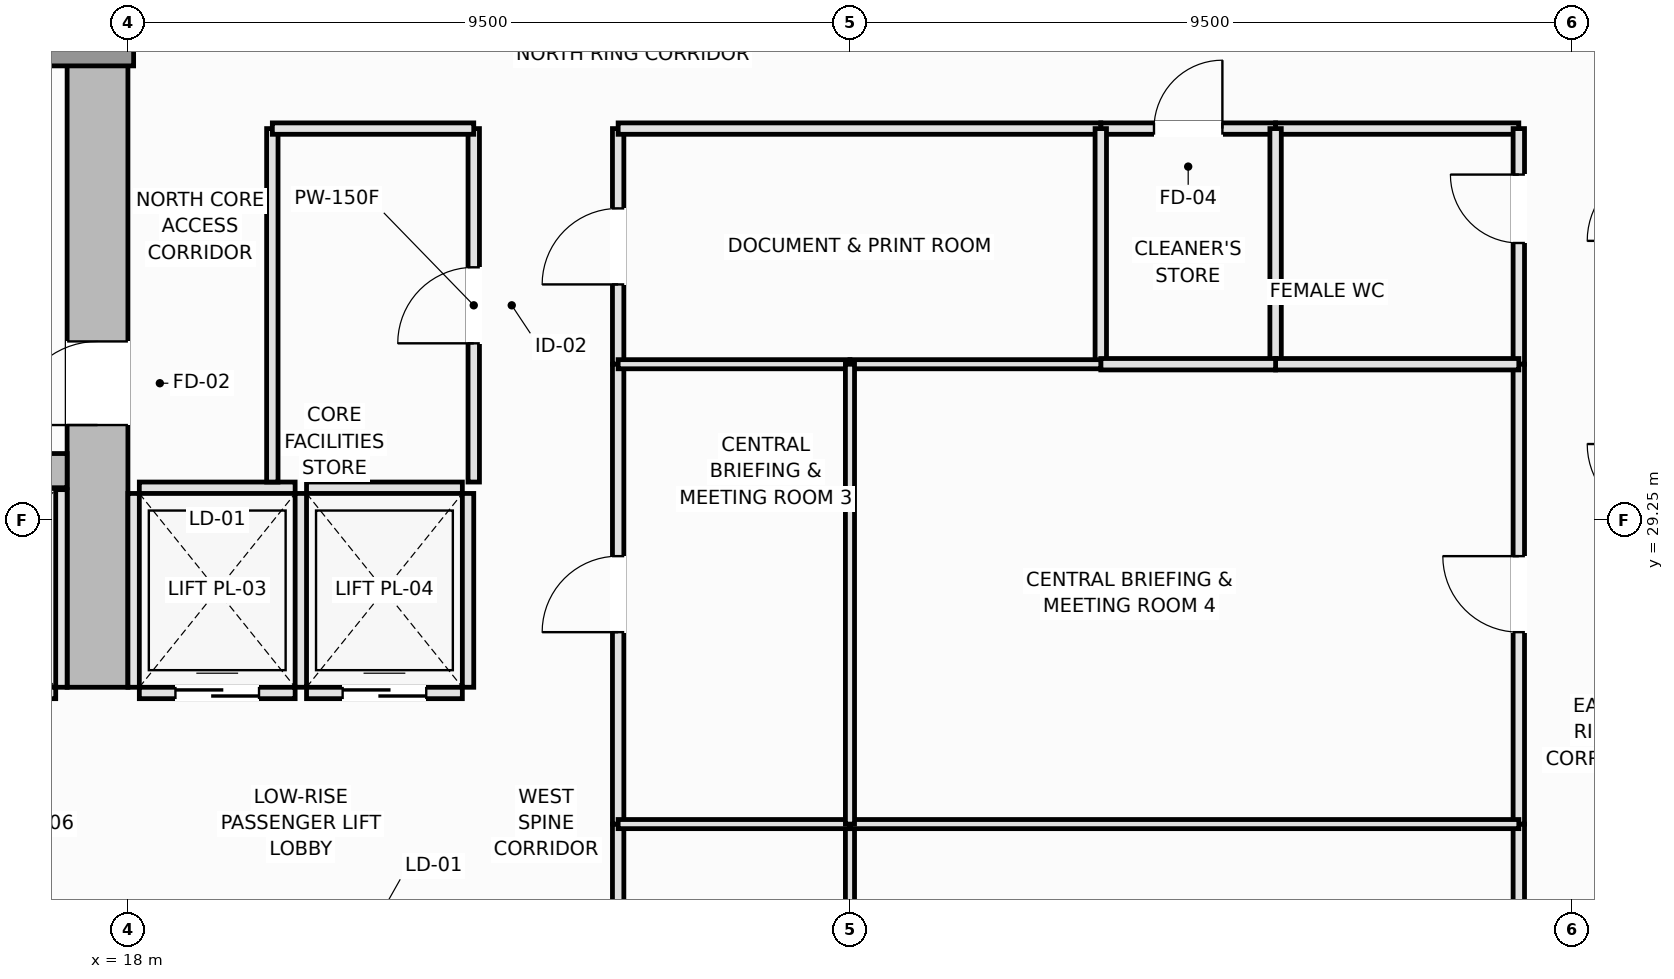
"""IFC4 building model, lengths in metres.
Left out: names, types, materials, properties, quantities, classifications, styles, units other than length and angle.
Written with IfcOpenShell. Run it as: python <this file> out.ifc"""

import sys

from ifc_helpers import new_model, si_unit, direction, frame, frame_2d, origin, origin_2d, place, context, subcontext, project, spatial, rectangle, extrude, element, fill, save


model = new_model("IFC4")
c1 = context("Model", 3, precision=1e-05, world=origin(), true_north=direction((0.0, 1.0)))
c2 = subcontext(c1, "Body", "Model", "MODEL_VIEW")
j1 = project(units=[si_unit("LENGTHUNIT", "METRE"), si_unit("PLANEANGLEUNIT", "RADIAN")], contexts=[c1])
p1 = place(None, origin())
s1 = spatial("IfcSite", under=j1, at=p1, CompositionType="ELEMENT")
p2 = place(p1, origin())
s2 = spatial("IfcBuilding", under=s1, at=p2, CompositionType="ELEMENT")
p3 = place(p2, frame((0.0, 0.0, 82.4)))
s3 = spatial("IfcBuildingStorey", under=s2, at=p3, CompositionType="ELEMENT", Elevation=82.4)
p4 = place(p3, frame((17.6, 27.05, 0.0), z_axis=(0.0, 0.0, 1.0), x_axis=(0.0, 1.0, 0.0)))
e1 = element("IfcWall", 1, at=p4, inside=s3, PredefinedType="SHEAR", context=c2, shape_type="SweptSolid", body=[
    extrude(rectangle(XDim=8.65, YDim=0.8, at=frame_2d((4.325, 0.0))), origin(), (0.0, 0.0, 1.0), 3.55),
])
p5 = place(p4, frame((3.45, 0.0, 0.0)))
e2 = element("IfcOpeningElement", 2, at=p5, cuts=e1, PredefinedType="OPENING", context=c2, shape_type="SweptSolid", body=[
    extrude(rectangle(XDim=1.1, YDim=2.15, at=frame_2d((0.55, 1.075))), frame((0.0, 0.41, 0.0), z_axis=(0.0, -1.0, 0.0), x_axis=(1.0, 0.0, 0.0)), (0.0, 0.0, 1.0), 0.82),
])
p6 = place(p3, frame((5.3, 29.9, 0.0), z_axis=(0.0, 0.0, 1.0), x_axis=(1.0, 0.0, 0.0)))
e3 = element("IfcWall", 3, at=p6, inside=s3, PredefinedType="SHEAR", context=c2, shape_type="SweptSolid", body=[
    extrude(rectangle(XDim=11.9, YDim=0.45, at=frame_2d((5.95, 0.0))), origin(), (0.0, 0.0, 1.0), 3.55),
])
p7 = place(p3, frame((17.4, 35.9, 0.0), z_axis=(0.0, 0.0, 1.0), x_axis=(1.0, 0.0, 0.0)))
e4 = element("IfcColumn", 4, at=p7, inside=s3, PredefinedType="PILASTER", context=c2, shape_type="SweptSolid", body=[
    extrude(rectangle(XDim=1.35, YDim=1.35, at=origin_2d()), origin(), (0.0, 0.0, 1.0), 3.55),
])
p8 = place(p3, frame((18.15, 26.975, 0.0), z_axis=(0.0, 0.0, 1.0), x_axis=(1.0, 0.0, 0.0)))
e5 = element("IfcWall", 5, at=p8, inside=s3, PredefinedType="PARTITIONING", context=c2, shape_type="SweptSolid", body=[
    extrude(rectangle(XDim=2.05, YDim=0.15, at=frame_2d((1.025, 0.0))), origin(), (0.0, 0.0, 1.0), 3.37),
])
p9 = place(p8, frame((0.475, 0.0, 0.0)))
e6 = element("IfcOpeningElement", 6, at=p9, cuts=e5, PredefinedType="OPENING", context=c2, shape_type="SweptSolid", body=[
    extrude(rectangle(XDim=1.1, YDim=2.2, at=frame_2d((0.55, 1.1))), frame((0.0, 0.085, 0.0), z_axis=(0.0, -1.0, 0.0), x_axis=(1.0, 0.0, 0.0)), (0.0, 0.0, 1.0), 0.17),
])
p10 = place(p3, frame((18.15, 29.675, 0.0), z_axis=(0.0, 0.0, 1.0), x_axis=(1.0, 0.0, 0.0)))
e7 = element("IfcWall", 7, at=p10, inside=s3, PredefinedType="PARTITIONING", context=c2, shape_type="SweptSolid", body=[
    extrude(rectangle(XDim=2.05, YDim=0.15, at=frame_2d((1.025, 0.0))), origin(), (0.0, 0.0, 1.0), 3.37),
])
for number, where, z_axis, x_axis in (
    (8, (18.075, 27.05, 0.0), (0.0, 0.0, 1.0), (0.0, 1.0, 0.0)),
    (9, (20.275, 27.05, 0.0), (0.0, 0.0, 1.0), (0.0, 1.0, 0.0)),
):
    element("IfcWall", number, at=place(p3, frame(where, z_axis=z_axis, x_axis=x_axis)), inside=s3, PredefinedType="PARTITIONING", context=c2, shape_type="SweptSolid", body=[
        extrude(rectangle(XDim=2.55, YDim=0.15, at=frame_2d((1.275, 0.0))), origin(), (0.0, 0.0, 1.0), 3.37),
    ])
p11 = place(p3, frame((20.35, 26.975, 0.0), z_axis=(0.0, 0.0, 1.0), x_axis=(1.0, 0.0, 0.0)))
e10 = element("IfcWall", 10, at=p11, inside=s3, PredefinedType="PARTITIONING", context=c2, shape_type="SweptSolid", body=[
    extrude(rectangle(XDim=2.05, YDim=0.15, at=frame_2d((1.025, 0.0))), origin(), (0.0, 0.0, 1.0), 3.37),
])
p12 = place(p11, frame((0.475, 0.0, 0.0)))
e11 = element("IfcOpeningElement", 11, at=p12, cuts=e10, PredefinedType="OPENING", context=c2, shape_type="SweptSolid", body=[
    extrude(rectangle(XDim=1.1, YDim=2.2, at=frame_2d((0.55, 1.1))), frame((0.0, 0.085, 0.0), z_axis=(0.0, -1.0, 0.0), x_axis=(1.0, 0.0, 0.0)), (0.0, 0.0, 1.0), 0.17),
])
p13 = place(p3, frame((20.35, 29.675, 0.0), z_axis=(0.0, 0.0, 1.0), x_axis=(1.0, 0.0, 0.0)))
e12 = element("IfcWall", 12, at=p13, inside=s3, PredefinedType="PARTITIONING", context=c2, shape_type="SweptSolid", body=[
    extrude(rectangle(XDim=2.05, YDim=0.15, at=frame_2d((1.025, 0.0))), origin(), (0.0, 0.0, 1.0), 3.37),
])
p14 = place(p3, frame((22.475, 27.05, 0.0), z_axis=(0.0, 0.0, 1.0), x_axis=(0.0, 1.0, 0.0)))
e13 = element("IfcWall", 13, at=p14, inside=s3, PredefinedType="PARTITIONING", context=c2, shape_type="SweptSolid", body=[
    extrude(rectangle(XDim=2.55, YDim=0.15, at=frame_2d((1.275, 0.0))), origin(), (0.0, 0.0, 1.0), 3.37),
])
p15 = place(p3, frame((14.5, 26.975, 0.0), z_axis=(0.0, 0.0, 1.0), x_axis=(1.0, 0.0, 0.0)))
e14 = element("IfcWall", 14, at=p15, inside=s3, PredefinedType="PARTITIONING", context=c2, shape_type="SweptSolid", body=[
    extrude(rectangle(XDim=2.55, YDim=0.15, at=frame_2d((1.275, 0.0))), origin(), (0.0, 0.0, 1.0), 3.37),
])
p16 = place(p15, frame((0.625, 0.0, 0.0)))
e15 = element("IfcOpeningElement", 15, at=p16, cuts=e14, PredefinedType="OPENING", context=c2, shape_type="SweptSolid", body=[
    extrude(rectangle(XDim=1.3, YDim=2.2, at=frame_2d((0.65, 1.1))), frame((0.0, 0.085, 0.0), z_axis=(0.0, -1.0, 0.0), x_axis=(1.0, 0.0, 0.0)), (0.0, 0.0, 1.0), 0.17),
])
p17 = place(p3, frame((17.125, 27.05, 0.0), z_axis=(0.0, 0.0, 1.0), x_axis=(0.0, 1.0, 0.0)))
e16 = element("IfcWall", 16, at=p17, inside=s3, PredefinedType="PARTITIONING", context=c2, shape_type="SweptSolid", body=[
    extrude(rectangle(XDim=2.6, YDim=0.15, at=frame_2d((1.3, 0.0))), origin(), (0.0, 0.0, 1.0), 3.37),
])
p18 = place(p3, frame((22.55, 29.75, 0.0), z_axis=(0.0, 0.0, 1.0), x_axis=(0.0, 1.0, 0.0)))
e17 = element("IfcWall", 17, at=p18, inside=s3, PredefinedType="PARTITIONING", context=c2, shape_type="SweptSolid", body=[
    extrude(rectangle(XDim=4.65, YDim=0.15, at=frame_2d((2.325, 0.0))), origin(), (0.0, 0.0, 1.0), 3.01),
])
p19 = place(p18, frame((1.825, 0.0, 0.0)))
e18 = element("IfcOpeningElement", 18, at=p19, cuts=e17, PredefinedType="OPENING", context=c2, shape_type="SweptSolid", body=[
    extrude(rectangle(XDim=1.0, YDim=2.15, at=frame_2d((0.5, 1.075))), frame((0.0, 0.085, 0.0), z_axis=(0.0, -1.0, 0.0), x_axis=(1.0, 0.0, 0.0)), (0.0, 0.0, 1.0), 0.17),
])
p20 = place(p3, frame((24.45, 31.3, 0.0), z_axis=(0.0, 0.0, 1.0), x_axis=(0.0, 1.0, 0.0)))
e19 = element("IfcWall", 19, at=p20, inside=s3, PredefinedType="PARTITIONING", context=c2, shape_type="SweptSolid", body=[
    extrude(rectangle(XDim=3.1, YDim=0.15, at=frame_2d((1.55, 0.0))), origin(), (0.0, 0.0, 1.0), 3.37),
])
p21 = place(p20, frame((1.05, 0.0, 0.0)))
e20 = element("IfcOpeningElement", 20, at=p21, cuts=e19, PredefinedType="OPENING", context=c2, shape_type="SweptSolid", body=[
    extrude(rectangle(XDim=1.0, YDim=2.15, at=frame_2d((0.5, 1.075))), frame((0.0, 0.085, 0.0), z_axis=(0.0, -1.0, 0.0), x_axis=(1.0, 0.0, 0.0)), (0.0, 0.0, 1.0), 0.17),
])
p22 = place(p3, frame((24.45, 17.9, 0.0), z_axis=(0.0, 0.0, 1.0), x_axis=(0.0, 1.0, 0.0)))
e21 = element("IfcWall", 21, at=p22, inside=s3, PredefinedType="PARTITIONING", context=c2, shape_type="SweptSolid", body=[
    extrude(rectangle(XDim=7.35, YDim=0.15, at=frame_2d((3.675, 0.0))), origin(), (0.0, 0.0, 1.0), 3.37),
])
p23 = place(p22, frame((3.175, 0.0, 0.0)))
e22 = element("IfcOpeningElement", 22, at=p23, cuts=e21, PredefinedType="OPENING", context=c2, shape_type="SweptSolid", body=[
    extrude(rectangle(XDim=1.0, YDim=2.15, at=frame_2d((0.5, 1.075))), frame((0.0, 0.085, 0.0), z_axis=(0.0, -1.0, 0.0), x_axis=(1.0, 0.0, 0.0)), (0.0, 0.0, 1.0), 0.17),
])
p24 = place(p3, frame((24.45, 25.25, 0.0), z_axis=(0.0, 0.0, 1.0), x_axis=(0.0, 1.0, 0.0)))
e23 = element("IfcWall", 23, at=p24, inside=s3, PredefinedType="PARTITIONING", context=c2, shape_type="SweptSolid", body=[
    extrude(rectangle(XDim=6.05, YDim=0.15, at=frame_2d((3.025, 0.0))), origin(), (0.0, 0.0, 1.0), 3.37),
])
p25 = place(p24, frame((2.525, 0.0, 0.0)))
e24 = element("IfcOpeningElement", 24, at=p25, cuts=e23, PredefinedType="OPENING", context=c2, shape_type="SweptSolid", body=[
    extrude(rectangle(XDim=1.0, YDim=2.15, at=frame_2d((0.5, 1.075))), frame((0.0, 0.085, 0.0), z_axis=(0.0, -1.0, 0.0), x_axis=(1.0, 0.0, 0.0)), (0.0, 0.0, 1.0), 0.17),
])
p26 = place(p3, frame((19.9, 29.75, 0.0), z_axis=(0.0, 0.0, 1.0), x_axis=(0.0, 1.0, 0.0)))
e25 = element("IfcWall", 25, at=p26, inside=s3, PredefinedType="PARTITIONING", context=c2, shape_type="SweptSolid", body=[
    extrude(rectangle(XDim=4.65, YDim=0.15, at=frame_2d((2.325, 0.0))), origin(), (0.0, 0.0, 1.0), 3.37),
])
p27 = place(p3, frame((19.9, 34.4, 0.0), z_axis=(0.0, 0.0, 1.0), x_axis=(1.0, 0.0, 0.0)))
e26 = element("IfcWall", 26, at=p27, inside=s3, PredefinedType="PARTITIONING", context=c2, shape_type="SweptSolid", body=[
    extrude(rectangle(XDim=2.65, YDim=0.15, at=frame_2d((1.325, 0.0))), origin(), (0.0, 0.0, 1.0), 3.37),
])
p28 = place(p3, frame((33.1, 34.4, 0.0), z_axis=(0.0, 0.0, 1.0), x_axis=(1.0, 0.0, 0.0)))
e27 = element("IfcWall", 27, at=p28, inside=s3, PredefinedType="PLUMBINGWALL", context=c2, shape_type="SweptSolid", body=[
    extrude(rectangle(XDim=3.2, YDim=0.15, at=frame_2d((1.6, 0.0))), origin(), (0.0, 0.0, 1.0), 3.37),
])
p29 = place(p3, frame((30.8, 34.4, 0.0), z_axis=(0.0, 0.0, 1.0), x_axis=(1.0, 0.0, 0.0)))
e28 = element("IfcWall", 28, at=p29, inside=s3, PredefinedType="PLUMBINGWALL", context=c2, shape_type="SweptSolid", body=[
    extrude(rectangle(XDim=2.3, YDim=0.15, at=frame_2d((1.15, 0.0))), origin(), (0.0, 0.0, 1.0), 3.37),
])
p30 = place(p29, frame((0.7, 0.0, 0.0)))
e29 = element("IfcOpeningElement", 29, at=p30, cuts=e28, PredefinedType="OPENING", context=c2, shape_type="SweptSolid", body=[
    extrude(rectangle(XDim=0.9, YDim=2.1, at=frame_2d((0.45, 1.05))), frame((0.0, 0.085, 0.0), z_axis=(0.0, -1.0, 0.0), x_axis=(1.0, 0.0, 0.0)), (0.0, 0.0, 1.0), 0.17),
])
p31 = place(p3, frame((24.45, 34.4, 0.0), z_axis=(0.0, 0.0, 1.0), x_axis=(1.0, 0.0, 0.0)))
e30 = element("IfcWall", 30, at=p31, inside=s3, PredefinedType="PARTITIONING", context=c2, shape_type="SweptSolid", body=[
    extrude(rectangle(XDim=6.35, YDim=0.15, at=frame_2d((3.175, 0.0))), origin(), (0.0, 0.0, 1.0), 3.37),
])
p32 = place(p3, frame((36.3, 31.3, 0.0), z_axis=(0.0, 0.0, 1.0), x_axis=(0.0, 1.0, 0.0)))
e31 = element("IfcWall", 31, at=p32, inside=s3, PredefinedType="PLUMBINGWALL", context=c2, shape_type="SweptSolid", body=[
    extrude(rectangle(XDim=3.1, YDim=0.15, at=frame_2d((1.55, 0.0))), origin(), (0.0, 0.0, 1.0), 3.37),
])
p33 = place(p32, frame((1.595, 0.0, 0.0)))
e32 = element("IfcOpeningElement", 32, at=p33, cuts=e31, PredefinedType="OPENING", context=c2, shape_type="SweptSolid", body=[
    extrude(rectangle(XDim=0.9, YDim=2.1, at=frame_2d((0.45, 1.05))), frame((0.0, 0.085, 0.0), z_axis=(0.0, -1.0, 0.0), x_axis=(1.0, 0.0, 0.0)), (0.0, 0.0, 1.0), 0.17),
])
p34 = place(p3, frame((36.3, 17.9, 0.0), z_axis=(0.0, 0.0, 1.0), x_axis=(0.0, 1.0, 0.0)))
e33 = element("IfcWall", 33, at=p34, inside=s3, PredefinedType="PARTITIONING", context=c2, shape_type="SweptSolid", body=[
    extrude(rectangle(XDim=7.35, YDim=0.15, at=frame_2d((3.675, 0.0))), origin(), (0.0, 0.0, 1.0), 3.37),
])
p35 = place(p34, frame((3.175, 0.0, 0.0)))
e34 = element("IfcOpeningElement", 34, at=p35, cuts=e33, PredefinedType="OPENING", context=c2, shape_type="SweptSolid", body=[
    extrude(rectangle(XDim=1.0, YDim=2.15, at=frame_2d((0.5, 1.075))), frame((0.0, 0.085, 0.0), z_axis=(0.0, -1.0, 0.0), x_axis=(1.0, 0.0, 0.0)), (0.0, 0.0, 1.0), 0.17),
])
p36 = place(p3, frame((36.3, 25.25, 0.0), z_axis=(0.0, 0.0, 1.0), x_axis=(0.0, 1.0, 0.0)))
e35 = element("IfcWall", 35, at=p36, inside=s3, PredefinedType="PARTITIONING", context=c2, shape_type="SweptSolid", body=[
    extrude(rectangle(XDim=6.05, YDim=0.15, at=frame_2d((3.025, 0.0))), origin(), (0.0, 0.0, 1.0), 3.37),
])
p37 = place(p36, frame((2.525, 0.0, 0.0)))
e36 = element("IfcOpeningElement", 36, at=p37, cuts=e35, PredefinedType="OPENING", context=c2, shape_type="SweptSolid", body=[
    extrude(rectangle(XDim=1.0, YDim=2.15, at=frame_2d((0.5, 1.075))), frame((0.0, 0.085, 0.0), z_axis=(0.0, -1.0, 0.0), x_axis=(1.0, 0.0, 0.0)), (0.0, 0.0, 1.0), 0.17),
])
p38 = place(p3, frame((33.1, 31.3, 0.0), z_axis=(0.0, 0.0, 1.0), x_axis=(0.0, 1.0, 0.0)))
e37 = element("IfcWall", 37, at=p38, inside=s3, PredefinedType="PLUMBINGWALL", context=c2, shape_type="SweptSolid", body=[
    extrude(rectangle(XDim=3.1, YDim=0.15, at=frame_2d((1.55, 0.0))), origin(), (0.0, 0.0, 1.0), 3.37),
])
p39 = place(p3, frame((33.1, 31.3, 0.0), z_axis=(0.0, 0.0, 1.0), x_axis=(1.0, 0.0, 0.0)))
e38 = element("IfcWall", 38, at=p39, inside=s3, PredefinedType="PLUMBINGWALL", context=c2, shape_type="SweptSolid", body=[
    extrude(rectangle(XDim=3.2, YDim=0.15, at=frame_2d((1.6, 0.0))), origin(), (0.0, 0.0, 1.0), 3.37),
])
p40 = place(p3, frame((30.8, 31.3, 0.0), z_axis=(0.0, 0.0, 1.0), x_axis=(0.0, 1.0, 0.0)))
e39 = element("IfcWall", 39, at=p40, inside=s3, PredefinedType="PLUMBINGWALL", context=c2, shape_type="SweptSolid", body=[
    extrude(rectangle(XDim=3.1, YDim=0.15, at=frame_2d((1.55, 0.0))), origin(), (0.0, 0.0, 1.0), 3.37),
])
p41 = place(p3, frame((30.8, 31.3, 0.0), z_axis=(0.0, 0.0, 1.0), x_axis=(1.0, 0.0, 0.0)))
e40 = element("IfcWall", 40, at=p41, inside=s3, PredefinedType="PLUMBINGWALL", context=c2, shape_type="SweptSolid", body=[
    extrude(rectangle(XDim=2.3, YDim=0.15, at=frame_2d((1.15, 0.0))), origin(), (0.0, 0.0, 1.0), 3.37),
])
p42 = place(p3, frame((24.45, 31.3, 0.0), z_axis=(0.0, 0.0, 1.0), x_axis=(1.0, 0.0, 0.0)))
e41 = element("IfcWall", 41, at=p42, inside=s3, PredefinedType="PARTITIONING", context=c2, shape_type="SweptSolid", body=[
    extrude(rectangle(XDim=3.05, YDim=0.12, at=frame_2d((1.525, 0.0))), origin(), (0.0, 0.0, 1.0), 3.37),
])
p43 = place(p3, frame((27.5, 31.3, 0.0), z_axis=(0.0, 0.0, 1.0), x_axis=(1.0, 0.0, 0.0)))
e42 = element("IfcWall", 42, at=p43, inside=s3, PredefinedType="PARTITIONING", context=c2, shape_type="SweptSolid", body=[
    extrude(rectangle(XDim=3.3, YDim=0.12, at=frame_2d((1.65, 0.0))), origin(), (0.0, 0.0, 1.0), 3.37),
])
p44 = place(p3, frame((27.5, 17.9, 0.0), z_axis=(0.0, 0.0, 1.0), x_axis=(0.0, 1.0, 0.0)))
e43 = element("IfcWall", 43, at=p44, inside=s3, PredefinedType="PARTITIONING", context=c2, shape_type="SweptSolid", body=[
    extrude(rectangle(XDim=7.35, YDim=0.12, at=frame_2d((3.675, 0.0))), origin(), (0.0, 0.0, 1.0), 3.37),
])
p45 = place(p3, frame((24.45, 25.25, 0.0), z_axis=(0.0, 0.0, 1.0), x_axis=(1.0, 0.0, 0.0)))
e44 = element("IfcWall", 44, at=p45, inside=s3, PredefinedType="PARTITIONING", context=c2, shape_type="SweptSolid", body=[
    extrude(rectangle(XDim=3.05, YDim=0.12, at=frame_2d((1.525, 0.0))), origin(), (0.0, 0.0, 1.0), 2.72),
])
p46 = place(p3, frame((27.5, 25.25, 0.0), z_axis=(0.0, 0.0, 1.0), x_axis=(1.0, 0.0, 0.0)))
e45 = element("IfcWall", 45, at=p46, inside=s3, PredefinedType="PARTITIONING", context=c2, shape_type="SweptSolid", body=[
    extrude(rectangle(XDim=8.8, YDim=0.12, at=frame_2d((4.4, 0.0))), origin(), (0.0, 0.0, 1.0), 2.72),
])
p47 = place(p3, frame((27.5, 25.25, 0.0), z_axis=(0.0, 0.0, 1.0), x_axis=(0.0, 1.0, 0.0)))
e46 = element("IfcWall", 46, at=p47, inside=s3, PredefinedType="PARTITIONING", context=c2, shape_type="SweptSolid", body=[
    extrude(rectangle(XDim=6.05, YDim=0.12, at=frame_2d((3.025, 0.0))), origin(), (0.0, 0.0, 1.0), 3.37),
])
p48 = place(p9, origin())
e47 = element("IfcDoor", 47, at=p48, inside=s3, OperationType="DOUBLE_DOOR_SLIDING", PredefinedType="DOOR", context=c2, shape_type="SweptSolid", body=[
    extrude(rectangle(XDim=1.1, YDim=2.2, at=frame_2d((0.55, 1.1))), frame((0.0, 0.025, 0.0), z_axis=(0.0, -1.0, 0.0), x_axis=(1.0, 0.0, 0.0)), (0.0, 0.0, 1.0), 0.05),
])
fill(e6, e47)
p49 = place(p12, origin())
e48 = element("IfcDoor", 48, at=p49, inside=s3, OperationType="DOUBLE_DOOR_SLIDING", PredefinedType="DOOR", context=c2, shape_type="SweptSolid", body=[
    extrude(rectangle(XDim=1.1, YDim=2.2, at=frame_2d((0.55, 1.1))), frame((0.0, 0.025, 0.0), z_axis=(0.0, -1.0, 0.0), x_axis=(1.0, 0.0, 0.0)), (0.0, 0.0, 1.0), 0.05),
])
fill(e11, e48)
p50 = place(p5, origin())
e49 = element("IfcDoor", 49, at=p50, inside=s3, OperationType="SINGLE_SWING_LEFT", PredefinedType="DOOR", context=c2, shape_type="SweptSolid", body=[
    extrude(rectangle(XDim=1.1, YDim=2.15, at=frame_2d((0.55, 1.075))), frame((0.0, 0.025, 0.0), z_axis=(0.0, -1.0, 0.0), x_axis=(1.0, 0.0, 0.0)), (0.0, 0.0, 1.0), 0.05),
])
fill(e2, e49)
p51 = place(p19, origin())
e50 = element("IfcDoor", 50, at=p51, inside=s3, OperationType="SINGLE_SWING_LEFT", PredefinedType="DOOR", context=c2, shape_type="SweptSolid", body=[
    extrude(rectangle(XDim=1.0, YDim=2.15, at=frame_2d((0.5, 1.075))), frame((0.0, 0.025, 0.0), z_axis=(0.0, -1.0, 0.0), x_axis=(1.0, 0.0, 0.0)), (0.0, 0.0, 1.0), 0.05),
])
fill(e18, e50)
p52 = place(p21, origin())
e51 = element("IfcDoor", 51, at=p52, inside=s3, OperationType="SINGLE_SWING_LEFT", PredefinedType="DOOR", context=c2, shape_type="SweptSolid", body=[
    extrude(rectangle(XDim=1.0, YDim=2.15, at=frame_2d((0.5, 1.075))), frame((0.0, 0.025, 0.0), z_axis=(0.0, -1.0, 0.0), x_axis=(1.0, 0.0, 0.0)), (0.0, 0.0, 1.0), 0.05),
])
fill(e20, e51)
p53 = place(p25, origin())
e52 = element("IfcDoor", 52, at=p53, inside=s3, OperationType="SINGLE_SWING_LEFT", PredefinedType="DOOR", context=c2, shape_type="SweptSolid", body=[
    extrude(rectangle(XDim=1.0, YDim=2.15, at=frame_2d((0.5, 1.075))), frame((0.0, 0.025, 0.0), z_axis=(0.0, -1.0, 0.0), x_axis=(1.0, 0.0, 0.0)), (0.0, 0.0, 1.0), 0.05),
])
fill(e24, e52)
p54 = place(p30, origin())
e53 = element("IfcDoor", 53, at=p54, inside=s3, OperationType="SINGLE_SWING_RIGHT", PredefinedType="DOOR", context=c2, shape_type="SweptSolid", body=[
    extrude(rectangle(XDim=0.9, YDim=2.1, at=frame_2d((0.45, 1.05))), frame((0.0, 0.025, 0.0), z_axis=(0.0, -1.0, 0.0), x_axis=(1.0, 0.0, 0.0)), (0.0, 0.0, 1.0), 0.05),
])
fill(e29, e53)
p55 = place(p33, origin())
e54 = element("IfcDoor", 54, at=p55, inside=s3, OperationType="SINGLE_SWING_RIGHT", PredefinedType="DOOR", context=c2, shape_type="SweptSolid", body=[
    extrude(rectangle(XDim=0.9, YDim=2.1, at=frame_2d((0.45, 1.05))), frame((0.0, 0.025, 0.0), z_axis=(0.0, -1.0, 0.0), x_axis=(1.0, 0.0, 0.0)), (0.0, 0.0, 1.0), 0.05),
])
fill(e32, e54)
p56 = place(p37, origin())
e55 = element("IfcDoor", 55, at=p56, inside=s3, OperationType="SINGLE_SWING_RIGHT", PredefinedType="DOOR", context=c2, shape_type="SweptSolid", body=[
    extrude(rectangle(XDim=1.0, YDim=2.15, at=frame_2d((0.5, 1.075))), frame((0.0, 0.025, 0.0), z_axis=(0.0, -1.0, 0.0), x_axis=(1.0, 0.0, 0.0)), (0.0, 0.0, 1.0), 0.05),
])
fill(e36, e55)
save(model, sys.argv[1])
